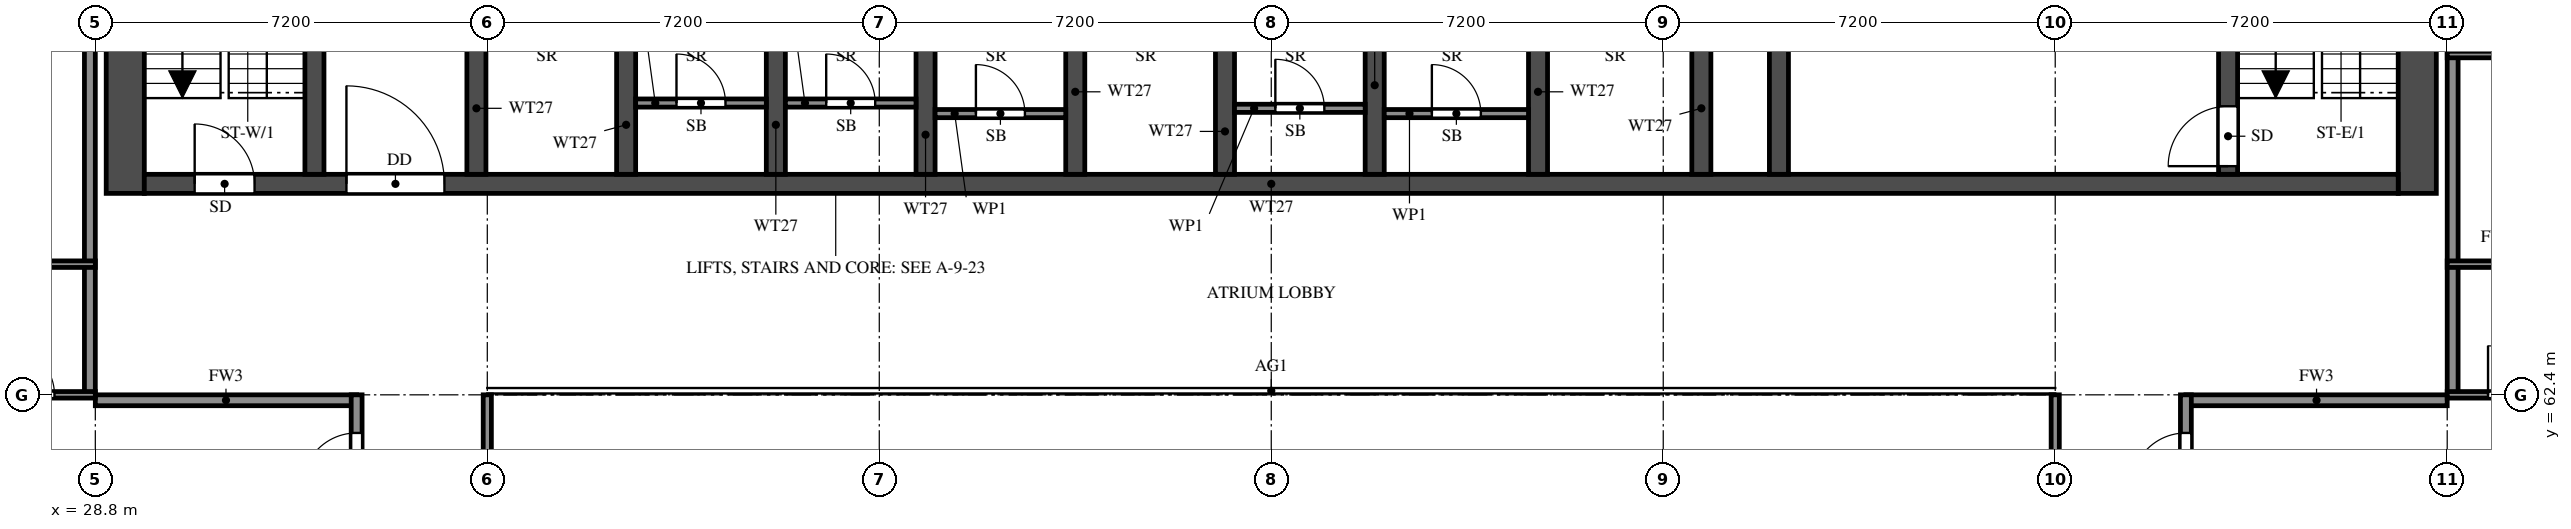
"""IFC4 building model, lengths in metres.
Left out: names, types, materials, properties, quantities, classifications, styles, units other than length and angle.
Written with IfcOpenShell. Run it as: python <this file> out.ifc"""

import sys

from ifc_helpers import new_model, si_unit, direction, frame, frame_2d, origin, place, context, subcontext, project, spatial, rectangle, extrude, element, fill, save


model = new_model("IFC4")
c1 = context("Model", 3, precision=1e-05, world=origin(), true_north=direction((0.0, 1.0)))
c2 = subcontext(c1, "Body", "Model", "MODEL_VIEW")
j1 = project(units=[si_unit("LENGTHUNIT", "METRE"), si_unit("PLANEANGLEUNIT", "RADIAN")], contexts=[c1])
p1 = place(None, origin())
s1 = spatial("IfcSite", under=j1, at=p1, CompositionType="ELEMENT")
p2 = place(p1, origin())
s2 = spatial("IfcBuilding", under=s1, at=p2, CompositionType="ELEMENT")
p3 = place(p2, frame((0.0, 0.0, 171.0)))
s3 = spatial("IfcBuildingStorey", under=s2, at=p3, CompositionType="ELEMENT", Elevation=171.0)
for number, where, z_axis, x_axis in (
    (1, (29.35, 66.1, 0.0), (0.0, 0.0, 1.0), (0.0, 1.0, 0.0)),
    (2, (71.45, 66.1, 0.0), (0.0, 0.0, 1.0), (0.0, 1.0, 0.0)),
):
    element("IfcWall", number, at=place(p3, frame(where, z_axis=z_axis, x_axis=x_axis)), inside=s3, PredefinedType="SHEAR", context=c2, shape_type="SweptSolid", body=[
        extrude(rectangle(XDim=11.9, YDim=0.7, at=frame_2d((5.95, 0.0))), origin(), (0.0, 0.0, 1.0), 3.2),
    ])
p4 = place(p3, frame((29.7, 66.275, 0.0), z_axis=(0.0, 0.0, 1.0), x_axis=(1.0, 0.0, 0.0)))
e3 = element("IfcWall", 3, at=p4, inside=s3, PredefinedType="SHEAR", context=c2, shape_type="SweptSolid", body=[
    extrude(rectangle(XDim=41.4, YDim=0.35, at=frame_2d((20.7, 0.0))), origin(), (0.0, 0.0, 1.0), 3.2),
])
p5 = place(p4, frame((0.925, 0.0, 0.0)))
e4 = element("IfcOpeningElement", 4, at=p5, cuts=e3, PredefinedType="OPENING", context=c2, shape_type="SweptSolid", body=[
    extrude(rectangle(XDim=1.1, YDim=2.1, at=frame_2d((0.55, 1.05))), frame((0.0, 0.185, 0.0), z_axis=(0.0, -1.0, 0.0), x_axis=(1.0, 0.0, 0.0)), (0.0, 0.0, 1.0), 0.37),
])
p6 = place(p4, frame((3.712, 0.0, 0.0)))
e5 = element("IfcOpeningElement", 5, at=p6, cuts=e3, PredefinedType="OPENING", context=c2, shape_type="SweptSolid", body=[
    extrude(rectangle(XDim=1.8, YDim=2.1, at=frame_2d((0.9, 1.05))), frame((0.0, 0.185, 0.0), z_axis=(0.0, -1.0, 0.0), x_axis=(1.0, 0.0, 0.0)), (0.0, 0.0, 1.0), 0.37),
])
p7 = place(p3, frame((32.825, 66.45, 0.0), z_axis=(0.0, 0.0, 1.0), x_axis=(0.0, 1.0, 0.0)))
e6 = element("IfcWall", 6, at=p7, inside=s3, PredefinedType="SHEAR", context=c2, shape_type="SweptSolid", body=[
    extrude(rectangle(XDim=10.85, YDim=0.35, at=frame_2d((5.425, 0.0))), origin(), (0.0, 0.0, 1.0), 3.2),
])
p8 = place(p3, frame((67.975, 66.45, 0.0), z_axis=(0.0, 0.0, 1.0), x_axis=(0.0, 1.0, 0.0)))
e7 = element("IfcWall", 7, at=p8, inside=s3, PredefinedType="SHEAR", context=c2, shape_type="SweptSolid", body=[
    extrude(rectangle(XDim=10.85, YDim=0.35, at=frame_2d((5.425, 0.0))), origin(), (0.0, 0.0, 1.0), 3.2),
])
p9 = place(p8, frame((0.15, 0.0, 0.0)))
e8 = element("IfcOpeningElement", 8, at=p9, cuts=e7, PredefinedType="OPENING", context=c2, shape_type="SweptSolid", body=[
    extrude(rectangle(XDim=1.1, YDim=2.1, at=frame_2d((0.55, 1.05))), frame((0.0, 0.185, 0.0), z_axis=(0.0, -1.0, 0.0), x_axis=(1.0, 0.0, 0.0)), (0.0, 0.0, 1.0), 0.37),
])
p10 = place(p3, frame((59.725, 66.45, 0.0), z_axis=(0.0, 0.0, 1.0), x_axis=(0.0, 1.0, 0.0)))
e9 = element("IfcWall", 9, at=p10, inside=s3, PredefinedType="SHEAR", context=c2, shape_type="SweptSolid", body=[
    extrude(rectangle(XDim=6.125, YDim=0.35, at=frame_2d((3.062, 0.0))), origin(), (0.0, 0.0, 1.0), 3.2),
])
p11 = place(p10, frame((3.85, 0.0, 0.0)))
e10 = element("IfcOpeningElement", 10, at=p11, cuts=e9, PredefinedType="OPENING", context=c2, shape_type="SweptSolid", body=[
    extrude(rectangle(XDim=1.2, YDim=2.1, at=frame_2d((0.6, 1.05))), frame((0.0, 0.185, 0.0), z_axis=(0.0, -1.0, 0.0), x_axis=(1.0, 0.0, 0.0)), (0.0, 0.0, 1.0), 0.37),
])
for number, where, z_axis, x_axis in (
    (11, (35.8, 66.45, 0.0), (0.0, 0.0, 1.0), (0.0, 1.0, 0.0)),
    (12, (38.55, 66.45, 0.0), (0.0, 0.0, 1.0), (0.0, 1.0, 0.0)),
    (13, (41.3, 66.45, 0.0), (0.0, 0.0, 1.0), (0.0, 1.0, 0.0)),
    (14, (44.05, 66.45, 0.0), (0.0, 0.0, 1.0), (0.0, 1.0, 0.0)),
    (15, (46.8, 66.45, 0.0), (0.0, 0.0, 1.0), (0.0, 1.0, 0.0)),
    (16, (49.55, 66.45, 0.0), (0.0, 0.0, 1.0), (0.0, 1.0, 0.0)),
    (17, (52.3, 66.45, 0.0), (0.0, 0.0, 1.0), (0.0, 1.0, 0.0)),
    (18, (55.3, 66.45, 0.0), (0.0, 0.0, 1.0), (0.0, 1.0, 0.0)),
    (19, (58.3, 66.45, 0.0), (0.0, 0.0, 1.0), (0.0, 1.0, 0.0)),
):
    element("IfcWall", number, at=place(p3, frame(where, z_axis=z_axis, x_axis=x_axis)), inside=s3, PredefinedType="SHEAR", context=c2, shape_type="SweptSolid", body=[
        extrude(rectangle(XDim=2.425, YDim=0.35, at=frame_2d((1.212, 0.0))), origin(), (0.0, 0.0, 1.0), 3.2),
    ])
p12 = place(p3, frame((38.725, 67.76, 0.0), z_axis=(0.0, 0.0, 1.0), x_axis=(1.0, 0.0, 0.0)))
e20 = element("IfcWall", 20, at=p12, inside=s3, PredefinedType="PARTITIONING", context=c2, shape_type="SweptSolid", body=[
    extrude(rectangle(XDim=2.4, YDim=0.15, at=frame_2d((1.2, 0.0))), origin(), (0.0, 0.0, 1.0), 3.2),
])
p13 = place(p12, frame((0.75, 0.0, 0.0)))
e21 = element("IfcOpeningElement", 21, at=p13, cuts=e20, PredefinedType="OPENING", context=c2, shape_type="SweptSolid", body=[
    extrude(rectangle(XDim=0.9, YDim=2.1, at=frame_2d((0.45, 1.05))), frame((0.0, 0.085, 0.0), z_axis=(0.0, -1.0, 0.0), x_axis=(1.0, 0.0, 0.0)), (0.0, 0.0, 1.0), 0.17),
])
p14 = place(p3, frame((41.475, 67.76, 0.0), z_axis=(0.0, 0.0, 1.0), x_axis=(1.0, 0.0, 0.0)))
e22 = element("IfcWall", 22, at=p14, inside=s3, PredefinedType="PARTITIONING", context=c2, shape_type="SweptSolid", body=[
    extrude(rectangle(XDim=2.4, YDim=0.15, at=frame_2d((1.2, 0.0))), origin(), (0.0, 0.0, 1.0), 3.2),
])
p15 = place(p14, frame((0.75, 0.0, 0.0)))
e23 = element("IfcOpeningElement", 23, at=p15, cuts=e22, PredefinedType="OPENING", context=c2, shape_type="SweptSolid", body=[
    extrude(rectangle(XDim=0.9, YDim=2.1, at=frame_2d((0.45, 1.05))), frame((0.0, 0.085, 0.0), z_axis=(0.0, -1.0, 0.0), x_axis=(1.0, 0.0, 0.0)), (0.0, 0.0, 1.0), 0.17),
])
p16 = place(p3, frame((44.225, 67.565, 0.0), z_axis=(0.0, 0.0, 1.0), x_axis=(1.0, 0.0, 0.0)))
e24 = element("IfcWall", 24, at=p16, inside=s3, PredefinedType="PARTITIONING", context=c2, shape_type="SweptSolid", body=[
    extrude(rectangle(XDim=2.4, YDim=0.15, at=frame_2d((1.2, 0.0))), origin(), (0.0, 0.0, 1.0), 3.2),
])
p17 = place(p16, frame((0.75, 0.0, 0.0)))
e25 = element("IfcOpeningElement", 25, at=p17, cuts=e24, PredefinedType="OPENING", context=c2, shape_type="SweptSolid", body=[
    extrude(rectangle(XDim=0.9, YDim=2.1, at=frame_2d((0.45, 1.05))), frame((0.0, 0.085, 0.0), z_axis=(0.0, -1.0, 0.0), x_axis=(1.0, 0.0, 0.0)), (0.0, 0.0, 1.0), 0.17),
])
p18 = place(p3, frame((49.725, 67.663, 0.0), z_axis=(0.0, 0.0, 1.0), x_axis=(1.0, 0.0, 0.0)))
e26 = element("IfcWall", 26, at=p18, inside=s3, PredefinedType="PARTITIONING", context=c2, shape_type="SweptSolid", body=[
    extrude(rectangle(XDim=2.4, YDim=0.15, at=frame_2d((1.2, 0.0))), origin(), (0.0, 0.0, 1.0), 3.2),
])
p19 = place(p18, frame((0.75, 0.0, 0.0)))
e27 = element("IfcOpeningElement", 27, at=p19, cuts=e26, PredefinedType="OPENING", context=c2, shape_type="SweptSolid", body=[
    extrude(rectangle(XDim=0.9, YDim=2.1, at=frame_2d((0.45, 1.05))), frame((0.0, 0.085, 0.0), z_axis=(0.0, -1.0, 0.0), x_axis=(1.0, 0.0, 0.0)), (0.0, 0.0, 1.0), 0.17),
])
p20 = place(p3, frame((52.475, 67.565, 0.0), z_axis=(0.0, 0.0, 1.0), x_axis=(1.0, 0.0, 0.0)))
e28 = element("IfcWall", 28, at=p20, inside=s3, PredefinedType="PARTITIONING", context=c2, shape_type="SweptSolid", body=[
    extrude(rectangle(XDim=2.65, YDim=0.15, at=frame_2d((1.325, 0.0))), origin(), (0.0, 0.0, 1.0), 3.2),
])
p21 = place(p20, frame((0.875, 0.0, 0.0)))
e29 = element("IfcOpeningElement", 29, at=p21, cuts=e28, PredefinedType="OPENING", context=c2, shape_type="SweptSolid", body=[
    extrude(rectangle(XDim=0.9, YDim=2.1, at=frame_2d((0.45, 1.05))), frame((0.0, 0.085, 0.0), z_axis=(0.0, -1.0, 0.0), x_axis=(1.0, 0.0, 0.0)), (0.0, 0.0, 1.0), 0.17),
])
for number, where, z_axis, x_axis in (
    (30, (28.8, 62.3, 0.0), (0.0, 0.0, 1.0), (1.0, 0.0, 0.0)),
    (31, (67.2, 62.3, 0.0), (0.0, 0.0, 1.0), (1.0, 0.0, 0.0)),
):
    element("IfcWall", number, at=place(p3, frame(where, z_axis=z_axis, x_axis=x_axis)), inside=s3, PredefinedType="SOLIDWALL", context=c2, shape_type="SweptSolid", body=[
        extrude(rectangle(XDim=4.8, YDim=0.2, at=frame_2d((2.4, 0.0))), origin(), (0.0, 0.0, 1.0), 3.2),
    ])
p22 = place(p3, frame((28.7, 62.4, 0.0), z_axis=(0.0, 0.0, 1.0), x_axis=(0.0, 1.0, 0.0)))
e32 = element("IfcWall", 32, at=p22, inside=s3, PredefinedType="SOLIDWALL", context=c2, shape_type="SweptSolid", body=[
    extrude(rectangle(XDim=15.6, YDim=0.2, at=frame_2d((7.8, 0.0))), origin(), (0.0, 0.0, 1.0), 3.2),
])
p23 = place(p3, frame((33.6, 60.0, 0.0), z_axis=(0.0, 0.0, 1.0), x_axis=(0.0, 1.0, 0.0)))
e33 = element("IfcWall", 33, at=p23, inside=s3, PredefinedType="SOLIDWALL", context=c2, shape_type="SweptSolid", body=[
    extrude(rectangle(XDim=2.4, YDim=0.2, at=frame_2d((1.2, 0.0))), origin(), (0.0, 0.0, 1.0), 3.2),
])
p24 = place(p23, frame((0.7, 0.0, 0.0)))
e34 = element("IfcOpeningElement", 34, at=p24, cuts=e33, PredefinedType="OPENING", context=c2, shape_type="SweptSolid", body=[
    extrude(rectangle(XDim=1.0, YDim=2.1, at=frame_2d((0.5, 1.05))), frame((0.0, 0.11, 0.0), z_axis=(0.0, -1.0, 0.0), x_axis=(1.0, 0.0, 0.0)), (0.0, 0.0, 1.0), 0.22),
])
p25 = place(p3, frame((67.2, 45.6, 0.0), z_axis=(0.0, 0.0, 1.0), x_axis=(0.0, 1.0, 0.0)))
e35 = element("IfcWall", 35, at=p25, inside=s3, PredefinedType="SOLIDWALL", context=c2, shape_type="SweptSolid", body=[
    extrude(rectangle(XDim=16.8, YDim=0.2, at=frame_2d((8.4, 0.0))), origin(), (0.0, 0.0, 1.0), 3.2),
])
p26 = place(p25, frame((6.7, 0.0, 0.0)))
e36 = element("IfcOpeningElement", 36, at=p26, cuts=e35, PredefinedType="OPENING", context=c2, shape_type="SweptSolid", body=[
    extrude(rectangle(XDim=1.0, YDim=2.1, at=frame_2d((0.5, 1.05))), frame((0.0, 0.11, 0.0), z_axis=(0.0, -1.0, 0.0), x_axis=(1.0, 0.0, 0.0)), (0.0, 0.0, 1.0), 0.22),
])
p27 = place(p25, frame((15.1, 0.0, 0.0)))
e37 = element("IfcOpeningElement", 37, at=p27, cuts=e35, PredefinedType="OPENING", context=c2, shape_type="SweptSolid", body=[
    extrude(rectangle(XDim=1.0, YDim=2.1, at=frame_2d((0.5, 1.05))), frame((0.0, 0.11, 0.0), z_axis=(0.0, -1.0, 0.0), x_axis=(1.0, 0.0, 0.0)), (0.0, 0.0, 1.0), 0.22),
])
p28 = place(p25, frame((0.7, 0.0, 0.0)))
e38 = element("IfcOpeningElement", 38, at=p28, cuts=e35, PredefinedType="OPENING", context=c2, shape_type="SweptSolid", body=[
    extrude(rectangle(XDim=1.0, YDim=2.1, at=frame_2d((0.5, 1.05))), frame((0.0, 0.11, 0.0), z_axis=(0.0, -1.0, 0.0), x_axis=(1.0, 0.0, 0.0)), (0.0, 0.0, 1.0), 0.22),
])
p29 = place(p3, frame((72.1, 62.4, 0.0), z_axis=(0.0, 0.0, 1.0), x_axis=(0.0, 1.0, 0.0)))
e39 = element("IfcWall", 39, at=p29, inside=s3, PredefinedType="SOLIDWALL", context=c2, shape_type="SweptSolid", body=[
    extrude(rectangle(XDim=15.6, YDim=0.2, at=frame_2d((7.8, 0.0))), origin(), (0.0, 0.0, 1.0), 3.2),
])
p30 = place(p3, frame((26.4, 62.4, 0.0), z_axis=(0.0, 0.0, 1.0), x_axis=(1.0, 0.0, 0.0)))
e40 = element("IfcWall", 40, at=p30, inside=s3, PredefinedType="PARTITIONING", context=c2, shape_type="SweptSolid", body=[
    extrude(rectangle(XDim=2.4, YDim=0.12, at=frame_2d((1.2, 0.0))), origin(), (0.0, 0.0, 1.0), 3.2),
])
p31 = place(p30, frame((0.75, 0.0, 0.0)))
e41 = element("IfcOpeningElement", 41, at=p31, cuts=e40, PredefinedType="OPENING", context=c2, shape_type="SweptSolid", body=[
    extrude(rectangle(XDim=0.9, YDim=2.1, at=frame_2d((0.45, 1.05))), frame((0.0, 0.07, 0.0), z_axis=(0.0, -1.0, 0.0), x_axis=(1.0, 0.0, 0.0)), (0.0, 0.0, 1.0), 0.14),
])
p32 = place(p3, frame((72.0, 62.4, 0.0), z_axis=(0.0, 0.0, 1.0), x_axis=(1.0, 0.0, 0.0)))
e42 = element("IfcWall", 42, at=p32, inside=s3, PredefinedType="PARTITIONING", context=c2, shape_type="SweptSolid", body=[
    extrude(rectangle(XDim=2.4, YDim=0.12, at=frame_2d((1.2, 0.0))), origin(), (0.0, 0.0, 1.0), 3.2),
])
p33 = place(p32, frame((0.75, 0.0, 0.0)))
e43 = element("IfcOpeningElement", 43, at=p33, cuts=e42, PredefinedType="OPENING", context=c2, shape_type="SweptSolid", body=[
    extrude(rectangle(XDim=0.9, YDim=2.1, at=frame_2d((0.45, 1.05))), frame((0.0, 0.07, 0.0), z_axis=(0.0, -1.0, 0.0), x_axis=(1.0, 0.0, 0.0)), (0.0, 0.0, 1.0), 0.14),
])
p34 = place(p3, frame((23.7, 64.8, 0.0), z_axis=(0.0, 0.0, 1.0), x_axis=(1.0, 0.0, 0.0)))
e44 = element("IfcWall", 44, at=p34, inside=s3, PredefinedType="PARTITIONING", context=c2, shape_type="SweptSolid", body=[
    extrude(rectangle(XDim=5.1, YDim=0.12, at=frame_2d((2.55, 0.0))), origin(), (0.0, 0.0, 1.0), 3.2),
])
p35 = place(p34, frame((2.1, 0.0, 0.0)))
e45 = element("IfcOpeningElement", 45, at=p35, cuts=e44, PredefinedType="OPENING", context=c2, shape_type="SweptSolid", body=[
    extrude(rectangle(XDim=0.9, YDim=2.1, at=frame_2d((0.45, 1.05))), frame((0.0, 0.07, 0.0), z_axis=(0.0, -1.0, 0.0), x_axis=(1.0, 0.0, 0.0)), (0.0, 0.0, 1.0), 0.14),
])
p36 = place(p3, frame((72.0, 64.8, 0.0), z_axis=(0.0, 0.0, 1.0), x_axis=(1.0, 0.0, 0.0)))
e46 = element("IfcWall", 46, at=p36, inside=s3, PredefinedType="PARTITIONING", context=c2, shape_type="SweptSolid", body=[
    extrude(rectangle(XDim=5.1, YDim=0.12, at=frame_2d((2.55, 0.0))), origin(), (0.0, 0.0, 1.0), 3.2),
])
p37 = place(p36, frame((2.1, 0.0, 0.0)))
e47 = element("IfcOpeningElement", 47, at=p37, cuts=e46, PredefinedType="OPENING", context=c2, shape_type="SweptSolid", body=[
    extrude(rectangle(XDim=0.9, YDim=2.1, at=frame_2d((0.45, 1.05))), frame((0.0, 0.07, 0.0), z_axis=(0.0, -1.0, 0.0), x_axis=(1.0, 0.0, 0.0)), (0.0, 0.0, 1.0), 0.14),
])
p38 = place(p3, frame((72.0, 68.65, 0.0), z_axis=(0.0, 0.0, 1.0), x_axis=(1.0, 0.0, 0.0)))
e48 = element("IfcWall", 48, at=p38, inside=s3, PredefinedType="PARTITIONING", context=c2, shape_type="SweptSolid", body=[
    extrude(rectangle(XDim=5.1, YDim=0.12, at=frame_2d((2.55, 0.0))), origin(), (0.0, 0.0, 1.0), 3.2),
])
for number, where, z_axis, x_axis in (
    (49, (36.0, 48.0, 0.0), (0.0, 0.0, 1.0), (0.0, 1.0, 0.0)),
    (50, (64.8, 48.0, 0.0), (0.0, 0.0, 1.0), (0.0, 1.0, 0.0)),
):
    element("IfcWall", number, at=place(p3, frame(where, z_axis=z_axis, x_axis=x_axis)), inside=s3, PredefinedType="SOLIDWALL", context=c2, shape_type="SweptSolid", body=[
        extrude(rectangle(XDim=14.4, YDim=0.15, at=frame_2d((7.2, 0.0))), origin(), (0.0, 0.0, 1.0), 2.3),
    ])
p39 = place(p5, origin())
e51 = element("IfcDoor", 51, at=p39, inside=s3, OperationType="SINGLE_SWING_LEFT", PredefinedType="DOOR", context=c2, shape_type="SweptSolid", body=[
    extrude(rectangle(XDim=1.1, YDim=2.1, at=frame_2d((0.55, 1.05))), frame((0.0, 0.025, 0.0), z_axis=(0.0, -1.0, 0.0), x_axis=(1.0, 0.0, 0.0)), (0.0, 0.0, 1.0), 0.05),
])
fill(e4, e51)
p40 = place(p9, origin())
e52 = element("IfcDoor", 52, at=p40, inside=s3, OperationType="SINGLE_SWING_LEFT", PredefinedType="DOOR", context=c2, shape_type="SweptSolid", body=[
    extrude(rectangle(XDim=1.1, YDim=2.1, at=frame_2d((0.55, 1.05))), frame((0.0, 0.025, 0.0), z_axis=(0.0, -1.0, 0.0), x_axis=(1.0, 0.0, 0.0)), (0.0, 0.0, 1.0), 0.05),
])
fill(e8, e52)
p41 = place(p6, origin())
e53 = element("IfcDoor", 53, at=p41, inside=s3, OperationType="DOUBLE_DOOR_SINGLE_SWING", PredefinedType="DOOR", context=c2, shape_type="SweptSolid", body=[
    extrude(rectangle(XDim=1.8, YDim=2.1, at=frame_2d((0.9, 1.05))), frame((0.0, 0.025, 0.0), z_axis=(0.0, -1.0, 0.0), x_axis=(1.0, 0.0, 0.0)), (0.0, 0.0, 1.0), 0.05),
])
fill(e5, e53)
p42 = place(p13, origin())
e54 = element("IfcDoor", 54, at=p42, inside=s3, OperationType="SINGLE_SWING_RIGHT", PredefinedType="DOOR", context=c2, shape_type="SweptSolid", body=[
    extrude(rectangle(XDim=0.9, YDim=2.1, at=frame_2d((0.45, 1.05))), frame((0.0, 0.025, 0.0), z_axis=(0.0, -1.0, 0.0), x_axis=(1.0, 0.0, 0.0)), (0.0, 0.0, 1.0), 0.05),
])
fill(e21, e54)
p43 = place(p15, origin())
e55 = element("IfcDoor", 55, at=p43, inside=s3, OperationType="SINGLE_SWING_LEFT", PredefinedType="DOOR", context=c2, shape_type="SweptSolid", body=[
    extrude(rectangle(XDim=0.9, YDim=2.1, at=frame_2d((0.45, 1.05))), frame((0.0, 0.025, 0.0), z_axis=(0.0, -1.0, 0.0), x_axis=(1.0, 0.0, 0.0)), (0.0, 0.0, 1.0), 0.05),
])
fill(e23, e55)
p44 = place(p17, origin())
e56 = element("IfcDoor", 56, at=p44, inside=s3, OperationType="SINGLE_SWING_LEFT", PredefinedType="DOOR", context=c2, shape_type="SweptSolid", body=[
    extrude(rectangle(XDim=0.9, YDim=2.1, at=frame_2d((0.45, 1.05))), frame((0.0, 0.025, 0.0), z_axis=(0.0, -1.0, 0.0), x_axis=(1.0, 0.0, 0.0)), (0.0, 0.0, 1.0), 0.05),
])
fill(e25, e56)
p45 = place(p19, origin())
e57 = element("IfcDoor", 57, at=p45, inside=s3, OperationType="SINGLE_SWING_LEFT", PredefinedType="DOOR", context=c2, shape_type="SweptSolid", body=[
    extrude(rectangle(XDim=0.9, YDim=2.1, at=frame_2d((0.45, 1.05))), frame((0.0, 0.025, 0.0), z_axis=(0.0, -1.0, 0.0), x_axis=(1.0, 0.0, 0.0)), (0.0, 0.0, 1.0), 0.05),
])
fill(e27, e57)
p46 = place(p21, origin())
e58 = element("IfcDoor", 58, at=p46, inside=s3, OperationType="SINGLE_SWING_RIGHT", PredefinedType="DOOR", context=c2, shape_type="SweptSolid", body=[
    extrude(rectangle(XDim=0.9, YDim=2.1, at=frame_2d((0.45, 1.05))), frame((0.0, 0.025, 0.0), z_axis=(0.0, -1.0, 0.0), x_axis=(1.0, 0.0, 0.0)), (0.0, 0.0, 1.0), 0.05),
])
fill(e29, e58)
p47 = place(p31, origin())
e59 = element("IfcDoor", 59, at=p47, inside=s3, OperationType="SINGLE_SWING_RIGHT", PredefinedType="DOOR", context=c2, shape_type="SweptSolid", body=[
    extrude(rectangle(XDim=0.9, YDim=2.1, at=frame_2d((0.45, 1.05))), frame((0.0, 0.025, 0.0), z_axis=(0.0, -1.0, 0.0), x_axis=(1.0, 0.0, 0.0)), (0.0, 0.0, 1.0), 0.05),
])
fill(e41, e59)
p48 = place(p24, origin())
e60 = element("IfcDoor", 60, at=p48, inside=s3, OperationType="SINGLE_SWING_LEFT", PredefinedType="DOOR", context=c2, shape_type="SweptSolid", body=[
    extrude(rectangle(XDim=1.0, YDim=2.1, at=frame_2d((0.5, 1.05))), frame((0.0, 0.025, 0.0), z_axis=(0.0, -1.0, 0.0), x_axis=(1.0, 0.0, 0.0)), (0.0, 0.0, 1.0), 0.05),
])
fill(e34, e60)
p49 = place(p33, origin())
e61 = element("IfcDoor", 61, at=p49, inside=s3, OperationType="SINGLE_SWING_LEFT", PredefinedType="DOOR", context=c2, shape_type="SweptSolid", body=[
    extrude(rectangle(XDim=0.9, YDim=2.1, at=frame_2d((0.45, 1.05))), frame((0.0, 0.025, 0.0), z_axis=(0.0, -1.0, 0.0), x_axis=(1.0, 0.0, 0.0)), (0.0, 0.0, 1.0), 0.05),
])
fill(e43, e61)
p50 = place(p27, origin())
e62 = element("IfcDoor", 62, at=p50, inside=s3, OperationType="SINGLE_SWING_RIGHT", PredefinedType="DOOR", context=c2, shape_type="SweptSolid", body=[
    extrude(rectangle(XDim=1.0, YDim=2.1, at=frame_2d((0.5, 1.05))), frame((0.0, 0.025, 0.0), z_axis=(0.0, -1.0, 0.0), x_axis=(1.0, 0.0, 0.0)), (0.0, 0.0, 1.0), 0.05),
])
fill(e37, e62)
save(model, sys.argv[1])
